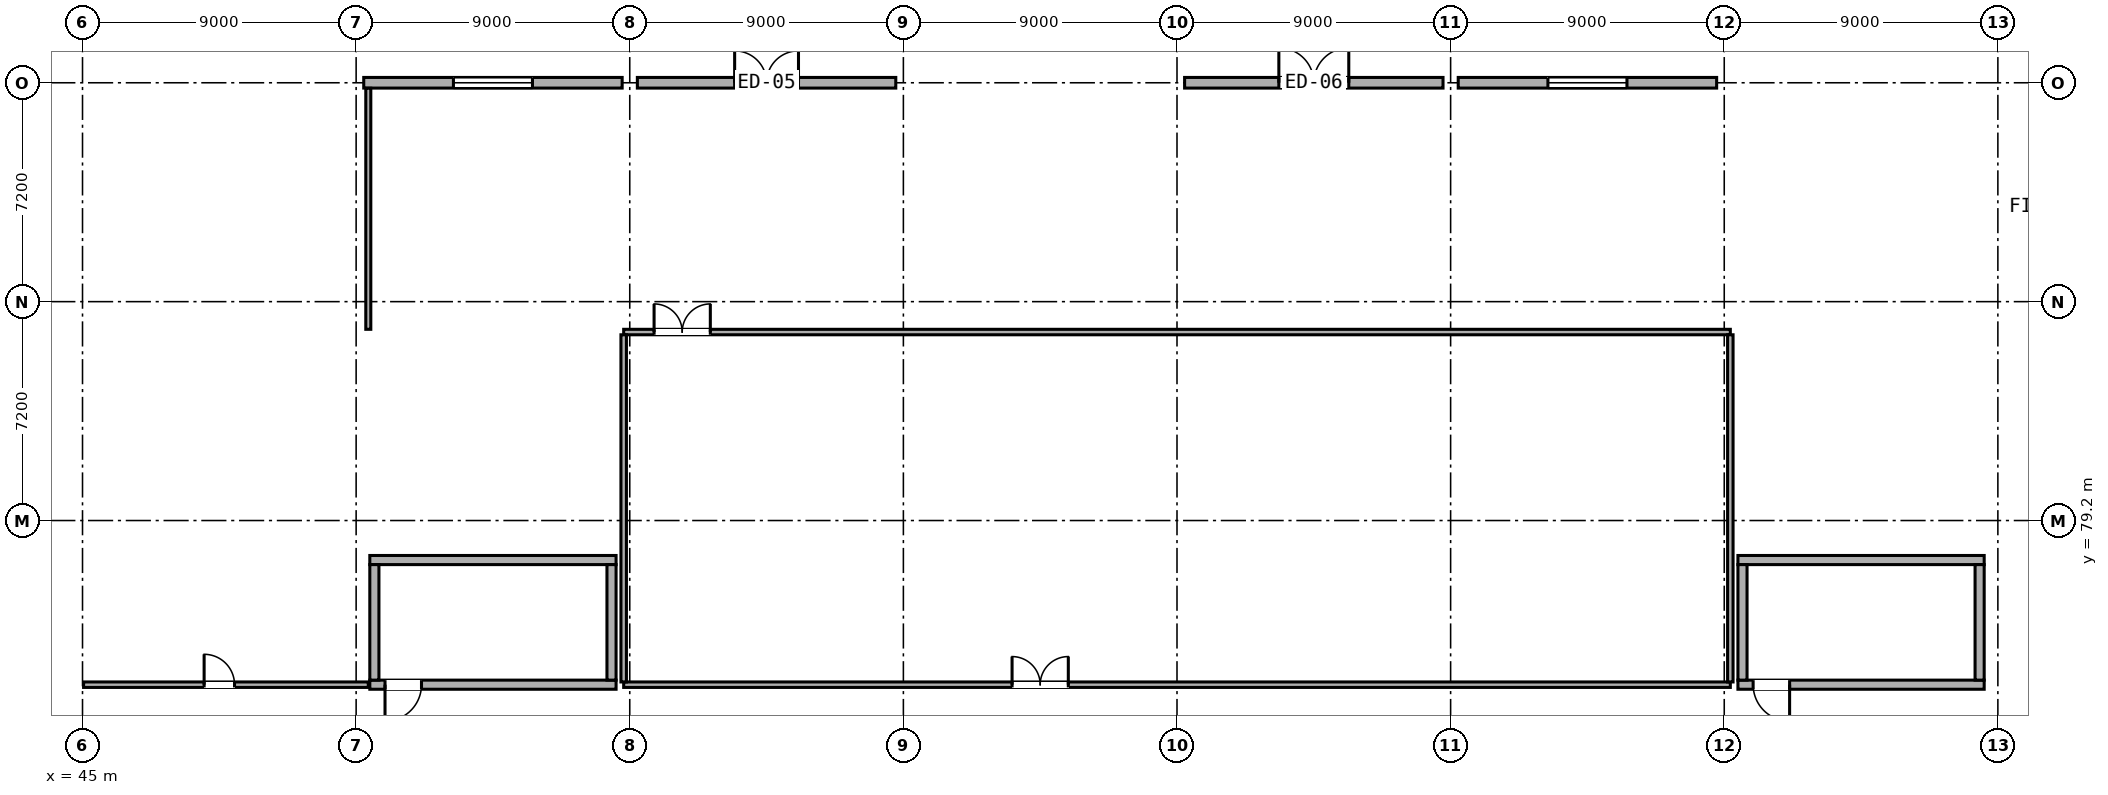
"""IFC4 building model, lengths in metres.
Left out: names, types, materials, properties, quantities, classifications, styles, units other than length and angle.
Written with IfcOpenShell. Run it as: python <this file> out.ifc"""

import sys

from ifc_helpers import new_model, si_unit, direction, frame, frame_2d, origin, origin_2d, place, context, subcontext, project, spatial, rectangle, hollow_rectangle, extrude, element, fill, save


model = new_model("IFC4")
c1 = context("Model", 3, precision=1e-05, world=origin(), true_north=direction((0.0, 1.0)))
c2 = subcontext(c1, "Body", "Model", "MODEL_VIEW")
j1 = project(units=[si_unit("LENGTHUNIT", "METRE"), si_unit("PLANEANGLEUNIT", "RADIAN")], contexts=[c1])
p1 = place(None, origin())
s1 = spatial("IfcSite", under=j1, at=p1, CompositionType="ELEMENT")
p2 = place(p1, origin())
s2 = spatial("IfcBuilding", under=s1, at=p2, CompositionType="ELEMENT")
p3 = place(p2, origin())
s3 = spatial("IfcBuildingStorey", under=s2, at=p3, CompositionType="ELEMENT", Elevation=0.0)
for number, where, z_axis, x_axis in (
    (1, (45.0, 79.2, 0.0), (0.0, 0.0, 1.0), (1.0, 0.0, 0.0)),
    (2, (45.0, 86.4, 0.0), (0.0, 0.0, 1.0), (1.0, 0.0, 0.0)),
    (3, (45.0, 93.6, 0.0), (0.0, 0.0, 1.0), (1.0, 0.0, 0.0)),
):
    element("IfcColumn", number, at=place(p3, frame(where, z_axis=z_axis, x_axis=x_axis)), inside=s3, PredefinedType="COLUMN", context=c2, shape_type="SweptSolid", body=[
        extrude(hollow_rectangle(XDim=0.5, YDim=0.5, WallThickness=0.022, at=origin_2d()), origin(), (0.0, 0.0, 1.0), 4.8),
    ])
for number, where, z_axis, x_axis in (
    (4, (54.0, 79.2, 0.0), (0.0, 0.0, 1.0), (1.0, 0.0, 0.0)),
    (5, (54.0, 86.4, 0.0), (0.0, 0.0, 1.0), (1.0, 0.0, 0.0)),
):
    element("IfcColumn", number, at=place(p3, frame(where, z_axis=z_axis, x_axis=x_axis)), inside=s3, PredefinedType="COLUMN", context=c2, shape_type="SweptSolid", body=[
        extrude(hollow_rectangle(XDim=0.65, YDim=0.65, WallThickness=0.025, at=origin_2d()), origin(), (0.0, 0.0, 1.0), 4.8),
    ])
p4 = place(p3, frame((54.0, 93.6, 0.0), z_axis=(0.0, 0.0, 1.0), x_axis=(1.0, 0.0, 0.0)))
e6 = element("IfcColumn", 6, at=p4, inside=s3, PredefinedType="COLUMN", context=c2, shape_type="SweptSolid", body=[
    extrude(hollow_rectangle(XDim=0.5, YDim=0.5, WallThickness=0.022, at=origin_2d()), origin(), (0.0, 0.0, 1.0), 4.8),
])
for number, where, z_axis, x_axis in (
    (7, (63.0, 79.2, 0.0), (0.0, 0.0, 1.0), (1.0, 0.0, 0.0)),
    (8, (63.0, 86.4, 0.0), (0.0, 0.0, 1.0), (1.0, 0.0, 0.0)),
):
    element("IfcColumn", number, at=place(p3, frame(where, z_axis=z_axis, x_axis=x_axis)), inside=s3, PredefinedType="COLUMN", context=c2, shape_type="SweptSolid", body=[
        extrude(hollow_rectangle(XDim=0.65, YDim=0.65, WallThickness=0.025, at=origin_2d()), origin(), (0.0, 0.0, 1.0), 4.8),
    ])
p5 = place(p3, frame((63.0, 93.6, 0.0), z_axis=(0.0, 0.0, 1.0), x_axis=(1.0, 0.0, 0.0)))
e9 = element("IfcColumn", 9, at=p5, inside=s3, PredefinedType="COLUMN", context=c2, shape_type="SweptSolid", body=[
    extrude(hollow_rectangle(XDim=0.5, YDim=0.5, WallThickness=0.022, at=origin_2d()), origin(), (0.0, 0.0, 1.0), 4.8),
])
for number, where, z_axis, x_axis in (
    (10, (72.0, 79.2, 0.0), (0.0, 0.0, 1.0), (1.0, 0.0, 0.0)),
    (11, (72.0, 86.4, 0.0), (0.0, 0.0, 1.0), (1.0, 0.0, 0.0)),
):
    element("IfcColumn", number, at=place(p3, frame(where, z_axis=z_axis, x_axis=x_axis)), inside=s3, PredefinedType="COLUMN", context=c2, shape_type="SweptSolid", body=[
        extrude(hollow_rectangle(XDim=0.65, YDim=0.65, WallThickness=0.025, at=origin_2d()), origin(), (0.0, 0.0, 1.0), 4.8),
    ])
p6 = place(p3, frame((72.0, 93.6, 0.0), z_axis=(0.0, 0.0, 1.0), x_axis=(1.0, 0.0, 0.0)))
e12 = element("IfcColumn", 12, at=p6, inside=s3, PredefinedType="COLUMN", context=c2, shape_type="SweptSolid", body=[
    extrude(hollow_rectangle(XDim=0.5, YDim=0.5, WallThickness=0.022, at=origin_2d()), origin(), (0.0, 0.0, 1.0), 4.8),
])
for number, where, z_axis, x_axis in (
    (13, (81.0, 79.2, 0.0), (0.0, 0.0, 1.0), (1.0, 0.0, 0.0)),
    (14, (81.0, 86.4, 0.0), (0.0, 0.0, 1.0), (1.0, 0.0, 0.0)),
):
    element("IfcColumn", number, at=place(p3, frame(where, z_axis=z_axis, x_axis=x_axis)), inside=s3, PredefinedType="COLUMN", context=c2, shape_type="SweptSolid", body=[
        extrude(hollow_rectangle(XDim=0.65, YDim=0.65, WallThickness=0.025, at=origin_2d()), origin(), (0.0, 0.0, 1.0), 4.8),
    ])
p7 = place(p3, frame((81.0, 93.6, 0.0), z_axis=(0.0, 0.0, 1.0), x_axis=(1.0, 0.0, 0.0)))
e15 = element("IfcColumn", 15, at=p7, inside=s3, PredefinedType="COLUMN", context=c2, shape_type="SweptSolid", body=[
    extrude(hollow_rectangle(XDim=0.5, YDim=0.5, WallThickness=0.022, at=origin_2d()), origin(), (0.0, 0.0, 1.0), 4.8),
])
for number, where, z_axis, x_axis in (
    (16, (90.0, 79.2, 0.0), (0.0, 0.0, 1.0), (1.0, 0.0, 0.0)),
    (17, (90.0, 86.4, 0.0), (0.0, 0.0, 1.0), (1.0, 0.0, 0.0)),
):
    element("IfcColumn", number, at=place(p3, frame(where, z_axis=z_axis, x_axis=x_axis)), inside=s3, PredefinedType="COLUMN", context=c2, shape_type="SweptSolid", body=[
        extrude(hollow_rectangle(XDim=0.65, YDim=0.65, WallThickness=0.025, at=origin_2d()), origin(), (0.0, 0.0, 1.0), 4.8),
    ])
p8 = place(p3, frame((90.0, 93.6, 0.0), z_axis=(0.0, 0.0, 1.0), x_axis=(1.0, 0.0, 0.0)))
e18 = element("IfcColumn", 18, at=p8, inside=s3, PredefinedType="COLUMN", context=c2, shape_type="SweptSolid", body=[
    extrude(hollow_rectangle(XDim=0.5, YDim=0.5, WallThickness=0.022, at=origin_2d()), origin(), (0.0, 0.0, 1.0), 4.8),
])
for number, where, z_axis, x_axis in (
    (19, (99.0, 79.2, 0.0), (0.0, 0.0, 1.0), (1.0, 0.0, 0.0)),
    (20, (99.0, 86.4, 0.0), (0.0, 0.0, 1.0), (1.0, 0.0, 0.0)),
):
    element("IfcColumn", number, at=place(p3, frame(where, z_axis=z_axis, x_axis=x_axis)), inside=s3, PredefinedType="COLUMN", context=c2, shape_type="SweptSolid", body=[
        extrude(hollow_rectangle(XDim=0.65, YDim=0.65, WallThickness=0.025, at=origin_2d()), origin(), (0.0, 0.0, 1.0), 4.8),
    ])
for number, where, z_axis, x_axis in (
    (21, (99.0, 93.6, 0.0), (0.0, 0.0, 1.0), (1.0, 0.0, 0.0)),
    (22, (108.0, 79.2, 0.0), (0.0, 0.0, 1.0), (1.0, 0.0, 0.0)),
    (23, (108.0, 86.4, 0.0), (0.0, 0.0, 1.0), (1.0, 0.0, 0.0)),
    (24, (108.0, 93.6, 0.0), (0.0, 0.0, 1.0), (1.0, 0.0, 0.0)),
):
    element("IfcColumn", number, at=place(p3, frame(where, z_axis=z_axis, x_axis=x_axis)), inside=s3, PredefinedType="COLUMN", context=c2, shape_type="SweptSolid", body=[
        extrude(hollow_rectangle(XDim=0.5, YDim=0.5, WallThickness=0.022, at=origin_2d()), origin(), (0.0, 0.0, 1.0), 4.8),
    ])
p9 = place(p3, frame((62.75, 93.6, 0.0), z_axis=(0.0, 0.0, 1.0), x_axis=(-1.0, 0.0, 0.0)))
e25 = element("IfcWall", 25, at=p9, inside=s3, PredefinedType="STANDARD", context=c2, shape_type="SweptSolid", body=[
    extrude(rectangle(XDim=8.5, YDim=0.35, at=frame_2d((4.25, 0.0))), origin(), (0.0, 0.0, 1.0), 4.055),
])
p10 = place(p9, frame((2.95, 0.0, 0.85)))
e26 = element("IfcOpeningElement", 26, at=p10, cuts=e25, PredefinedType="OPENING", context=c2, shape_type="SweptSolid", body=[
    extrude(rectangle(XDim=2.6, YDim=1.6, at=frame_2d((1.3, 0.8))), frame((0.0, 0.187, 0.0), z_axis=(0.0, -1.0, 0.0), x_axis=(1.0, 0.0, 0.0)), (0.0, 0.0, 1.0), 0.374),
])
p11 = place(p3, frame((71.75, 93.6, 0.0), z_axis=(0.0, 0.0, 1.0), x_axis=(-1.0, 0.0, 0.0)))
e27 = element("IfcWall", 27, at=p11, inside=s3, PredefinedType="STANDARD", context=c2, shape_type="SweptSolid", body=[
    extrude(rectangle(XDim=8.5, YDim=0.35, at=frame_2d((4.25, 0.0))), origin(), (0.0, 0.0, 1.0), 4.055),
])
p12 = place(p11, frame((3.2, 0.0, 0.0)))
e28 = element("IfcOpeningElement", 28, at=p12, cuts=e27, PredefinedType="OPENING", context=c2, shape_type="SweptSolid", body=[
    extrude(rectangle(XDim=2.1, YDim=2.45, at=frame_2d((1.05, 1.225))), frame((0.0, 0.187, 0.0), z_axis=(0.0, -1.0, 0.0), x_axis=(1.0, 0.0, 0.0)), (0.0, 0.0, 1.0), 0.374),
])
p13 = place(p3, frame((89.75, 93.6, 0.0), z_axis=(0.0, 0.0, 1.0), x_axis=(-1.0, 0.0, 0.0)))
e29 = element("IfcWall", 29, at=p13, inside=s3, PredefinedType="STANDARD", context=c2, shape_type="SweptSolid", body=[
    extrude(rectangle(XDim=8.5, YDim=0.35, at=frame_2d((4.25, 0.0))), origin(), (0.0, 0.0, 1.0), 4.055),
])
p14 = place(p13, frame((3.1, 0.0, 0.0)))
e30 = element("IfcOpeningElement", 30, at=p14, cuts=e29, PredefinedType="OPENING", context=c2, shape_type="SweptSolid", body=[
    extrude(rectangle(XDim=2.3, YDim=2.5, at=frame_2d((1.15, 1.25))), frame((0.0, 0.187, 0.0), z_axis=(0.0, -1.0, 0.0), x_axis=(1.0, 0.0, 0.0)), (0.0, 0.0, 1.0), 0.374),
])
p15 = place(p3, frame((98.75, 93.6, 0.0), z_axis=(0.0, 0.0, 1.0), x_axis=(-1.0, 0.0, 0.0)))
e31 = element("IfcWall", 31, at=p15, inside=s3, PredefinedType="STANDARD", context=c2, shape_type="SweptSolid", body=[
    extrude(rectangle(XDim=8.5, YDim=0.35, at=frame_2d((4.25, 0.0))), origin(), (0.0, 0.0, 1.0), 4.055),
])
p16 = place(p15, frame((2.95, 0.0, 0.85)))
e32 = element("IfcOpeningElement", 32, at=p16, cuts=e31, PredefinedType="OPENING", context=c2, shape_type="SweptSolid", body=[
    extrude(rectangle(XDim=2.6, YDim=1.6, at=frame_2d((1.3, 0.8))), frame((0.0, 0.187, 0.0), z_axis=(0.0, -1.0, 0.0), x_axis=(1.0, 0.0, 0.0)), (0.0, 0.0, 1.0), 0.374),
])
p17 = place(p3, frame((54.45, 73.8, 0.0), z_axis=(0.0, 0.0, 1.0), x_axis=(1.0, 0.0, 0.0)))
e33 = element("IfcWall", 33, at=p17, inside=s3, PredefinedType="SHEAR", context=c2, shape_type="SweptSolid", body=[
    extrude(rectangle(XDim=8.1, YDim=0.3, at=frame_2d((4.05, 0.0))), origin(), (0.0, 0.0, 1.0), 4.555),
])
p18 = place(p17, frame((0.5, 0.0, 0.0)))
e34 = element("IfcOpeningElement", 34, at=p18, cuts=e33, PredefinedType="OPENING", context=c2, shape_type="SweptSolid", body=[
    extrude(rectangle(XDim=1.2, YDim=2.1, at=frame_2d((0.6, 1.05))), frame((0.0, 0.162, 0.0), z_axis=(0.0, -1.0, 0.0), x_axis=(1.0, 0.0, 0.0)), (0.0, 0.0, 1.0), 0.324),
])
p19 = place(p3, frame((54.45, 77.9, 0.0), z_axis=(0.0, 0.0, 1.0), x_axis=(1.0, 0.0, 0.0)))
e35 = element("IfcWall", 35, at=p19, inside=s3, PredefinedType="SHEAR", context=c2, shape_type="SweptSolid", body=[
    extrude(rectangle(XDim=8.1, YDim=0.3, at=frame_2d((4.05, 0.0))), origin(), (0.0, 0.0, 1.0), 4.555),
])
for number, where, z_axis, x_axis in (
    (36, (54.6, 73.95, 0.0), (0.0, 0.0, 1.0), (0.0, 1.0, 0.0)),
    (37, (62.4, 73.95, 0.0), (0.0, 0.0, 1.0), (0.0, 1.0, 0.0)),
):
    element("IfcWall", number, at=place(p3, frame(where, z_axis=z_axis, x_axis=x_axis)), inside=s3, PredefinedType="SHEAR", context=c2, shape_type="SweptSolid", body=[
        extrude(rectangle(XDim=3.8, YDim=0.3, at=frame_2d((1.9, 0.0))), origin(), (0.0, 0.0, 1.0), 4.555),
    ])
p20 = place(p3, frame((99.45, 73.8, 0.0), z_axis=(0.0, 0.0, 1.0), x_axis=(1.0, 0.0, 0.0)))
e38 = element("IfcWall", 38, at=p20, inside=s3, PredefinedType="SHEAR", context=c2, shape_type="SweptSolid", body=[
    extrude(rectangle(XDim=8.1, YDim=0.3, at=frame_2d((4.05, 0.0))), origin(), (0.0, 0.0, 1.0), 4.555),
])
p21 = place(p20, frame((0.5, 0.0, 0.0)))
e39 = element("IfcOpeningElement", 39, at=p21, cuts=e38, PredefinedType="OPENING", context=c2, shape_type="SweptSolid", body=[
    extrude(rectangle(XDim=1.2, YDim=2.1, at=frame_2d((0.6, 1.05))), frame((0.0, 0.162, 0.0), z_axis=(0.0, -1.0, 0.0), x_axis=(1.0, 0.0, 0.0)), (0.0, 0.0, 1.0), 0.324),
])
p22 = place(p3, frame((99.45, 77.9, 0.0), z_axis=(0.0, 0.0, 1.0), x_axis=(1.0, 0.0, 0.0)))
e40 = element("IfcWall", 40, at=p22, inside=s3, PredefinedType="SHEAR", context=c2, shape_type="SweptSolid", body=[
    extrude(rectangle(XDim=8.1, YDim=0.3, at=frame_2d((4.05, 0.0))), origin(), (0.0, 0.0, 1.0), 4.555),
])
for number, where, z_axis, x_axis in (
    (41, (99.6, 73.95, 0.0), (0.0, 0.0, 1.0), (0.0, 1.0, 0.0)),
    (42, (107.4, 73.95, 0.0), (0.0, 0.0, 1.0), (0.0, 1.0, 0.0)),
):
    element("IfcWall", number, at=place(p3, frame(where, z_axis=z_axis, x_axis=x_axis)), inside=s3, PredefinedType="SHEAR", context=c2, shape_type="SweptSolid", body=[
        extrude(rectangle(XDim=3.8, YDim=0.3, at=frame_2d((1.9, 0.0))), origin(), (0.0, 0.0, 1.0), 4.555),
    ])
p23 = place(p3, frame((62.8, 73.8, 0.0), z_axis=(0.0, 0.0, 1.0), x_axis=(1.0, 0.0, 0.0)))
e43 = element("IfcWall", 43, at=p23, inside=s3, PredefinedType="PARTITIONING", context=c2, shape_type="SweptSolid", body=[
    extrude(rectangle(XDim=36.4, YDim=0.18, at=frame_2d((18.2, 0.0))), origin(), (0.0, 0.0, 1.0), 4.555),
])
p24 = place(p23, frame((12.775, 0.0, 0.0)))
e44 = element("IfcOpeningElement", 44, at=p24, cuts=e43, PredefinedType="OPENING", context=c2, shape_type="SweptSolid", body=[
    extrude(rectangle(XDim=1.85, YDim=2.12, at=frame_2d((0.925, 1.06))), frame((0.0, 0.102, 0.0), z_axis=(0.0, -1.0, 0.0), x_axis=(1.0, 0.0, 0.0)), (0.0, 0.0, 1.0), 0.204),
])
p25 = place(p3, frame((62.8, 85.4, 0.0), z_axis=(0.0, 0.0, 1.0), x_axis=(1.0, 0.0, 0.0)))
e45 = element("IfcWall", 45, at=p25, inside=s3, PredefinedType="PARTITIONING", context=c2, shape_type="SweptSolid", body=[
    extrude(rectangle(XDim=36.4, YDim=0.18, at=frame_2d((18.2, 0.0))), origin(), (0.0, 0.0, 1.0), 4.555),
])
p26 = place(p25, frame((1.0, 0.0, 0.0)))
e46 = element("IfcOpeningElement", 46, at=p26, cuts=e45, PredefinedType="OPENING", context=c2, shape_type="SweptSolid", body=[
    extrude(rectangle(XDim=1.85, YDim=2.12, at=frame_2d((0.925, 1.06))), frame((0.0, 0.102, 0.0), z_axis=(0.0, -1.0, 0.0), x_axis=(1.0, 0.0, 0.0)), (0.0, 0.0, 1.0), 0.204),
])
for number, where, z_axis, x_axis in (
    (47, (62.8, 73.89, 0.0), (0.0, 0.0, 1.0), (0.0, 1.0, 0.0)),
    (48, (99.2, 73.89, 0.0), (0.0, 0.0, 1.0), (0.0, 1.0, 0.0)),
):
    element("IfcWall", number, at=place(p3, frame(where, z_axis=z_axis, x_axis=x_axis)), inside=s3, PredefinedType="PARTITIONING", context=c2, shape_type="SweptSolid", body=[
        extrude(rectangle(XDim=11.42, YDim=0.18, at=frame_2d((5.71, 0.0))), origin(), (0.0, 0.0, 1.0), 3.835),
    ])
p27 = place(p3, frame((45.035, 73.8, 0.0), z_axis=(0.0, 0.0, 1.0), x_axis=(1.0, 0.0, 0.0)))
e49 = element("IfcWall", 49, at=p27, inside=s3, PredefinedType="PARTITIONING", context=c2, shape_type="SweptSolid", body=[
    extrude(rectangle(XDim=9.365, YDim=0.18, at=frame_2d((4.683, 0.0))), origin(), (0.0, 0.0, 1.0), 4.555),
])
p28 = place(p27, frame((3.965, 0.0, 0.0)))
e50 = element("IfcOpeningElement", 50, at=p28, cuts=e49, PredefinedType="OPENING", context=c2, shape_type="SweptSolid", body=[
    extrude(rectangle(XDim=1.0, YDim=2.08, at=frame_2d((0.5, 1.04))), frame((0.0, 0.102, 0.0), z_axis=(0.0, -1.0, 0.0), x_axis=(1.0, 0.0, 0.0)), (0.0, 0.0, 1.0), 0.204),
])
p29 = place(p3, frame((54.4, 85.49, 0.0), z_axis=(0.0, 0.0, 1.0), x_axis=(0.0, 1.0, 0.0)))
e51 = element("IfcWall", 51, at=p29, inside=s3, PredefinedType="PARTITIONING", context=c2, shape_type="SweptSolid", body=[
    extrude(rectangle(XDim=7.93, YDim=0.165, at=frame_2d((3.965, 0.0))), origin(), (0.0, 0.0, 1.0), 4.555),
])
p30 = place(p10, origin())
e52 = element("IfcWindow", 52, at=p30, inside=s3, PartitioningType="DOUBLE_PANEL_VERTICAL", PredefinedType="WINDOW", context=c2, shape_type="SweptSolid", body=[
    extrude(rectangle(XDim=2.6, YDim=1.6, at=frame_2d((1.3, 0.8))), frame((0.0, 0.03, 0.0), z_axis=(0.0, -1.0, 0.0), x_axis=(1.0, 0.0, 0.0)), (0.0, 0.0, 1.0), 0.06),
])
fill(e26, e52)
p31 = place(p12, frame((2.1, 0.0, 0.0), z_axis=(0.0, 0.0, 1.0), x_axis=(-1.0, 0.0, 0.0)))
e53 = element("IfcDoor", 53, at=p31, inside=s3, OperationType="DOUBLE_DOOR_SINGLE_SWING", PredefinedType="DOOR", context=c2, shape_type="SweptSolid", body=[
    extrude(rectangle(XDim=2.1, YDim=2.45, at=frame_2d((1.05, 1.225))), frame((0.0, 0.025, 0.0), z_axis=(0.0, -1.0, 0.0), x_axis=(1.0, 0.0, 0.0)), (0.0, 0.0, 1.0), 0.05),
])
fill(e28, e53)
p32 = place(p14, frame((2.3, 0.0, 0.0), z_axis=(0.0, 0.0, 1.0), x_axis=(-1.0, 0.0, 0.0)))
e54 = element("IfcDoor", 54, at=p32, inside=s3, OperationType="DOUBLE_DOOR_SINGLE_SWING", PredefinedType="DOOR", context=c2, shape_type="SweptSolid", body=[
    extrude(rectangle(XDim=2.3, YDim=2.5, at=frame_2d((1.15, 1.25))), frame((0.0, 0.025, 0.0), z_axis=(0.0, -1.0, 0.0), x_axis=(1.0, 0.0, 0.0)), (0.0, 0.0, 1.0), 0.05),
])
fill(e30, e54)
p33 = place(p16, origin())
e55 = element("IfcWindow", 55, at=p33, inside=s3, PartitioningType="DOUBLE_PANEL_VERTICAL", PredefinedType="WINDOW", context=c2, shape_type="SweptSolid", body=[
    extrude(rectangle(XDim=2.6, YDim=1.6, at=frame_2d((1.3, 0.8))), frame((0.0, 0.03, 0.0), z_axis=(0.0, -1.0, 0.0), x_axis=(1.0, 0.0, 0.0)), (0.0, 0.0, 1.0), 0.06),
])
fill(e32, e55)
p34 = place(p18, frame((1.2, 0.0, 0.0), z_axis=(0.0, 0.0, 1.0), x_axis=(-1.0, 0.0, 0.0)))
e56 = element("IfcDoor", 56, at=p34, inside=s3, OperationType="SINGLE_SWING_RIGHT", PredefinedType="DOOR", context=c2, shape_type="SweptSolid", body=[
    extrude(rectangle(XDim=1.2, YDim=2.1, at=frame_2d((0.6, 1.05))), frame((0.0, 0.025, 0.0), z_axis=(0.0, -1.0, 0.0), x_axis=(1.0, 0.0, 0.0)), (0.0, 0.0, 1.0), 0.05),
])
fill(e34, e56)
p35 = place(p21, frame((1.2, 0.0, 0.0), z_axis=(0.0, 0.0, 1.0), x_axis=(-1.0, 0.0, 0.0)))
e57 = element("IfcDoor", 57, at=p35, inside=s3, OperationType="SINGLE_SWING_LEFT", PredefinedType="DOOR", context=c2, shape_type="SweptSolid", body=[
    extrude(rectangle(XDim=1.2, YDim=2.1, at=frame_2d((0.6, 1.05))), frame((0.0, 0.025, 0.0), z_axis=(0.0, -1.0, 0.0), x_axis=(1.0, 0.0, 0.0)), (0.0, 0.0, 1.0), 0.05),
])
fill(e39, e57)
p36 = place(p24, origin())
e58 = element("IfcDoor", 58, at=p36, inside=s3, OperationType="DOUBLE_DOOR_SINGLE_SWING", PredefinedType="DOOR", context=c2, shape_type="SweptSolid", body=[
    extrude(rectangle(XDim=1.85, YDim=2.12, at=frame_2d((0.925, 1.06))), frame((0.0, 0.025, 0.0), z_axis=(0.0, -1.0, 0.0), x_axis=(1.0, 0.0, 0.0)), (0.0, 0.0, 1.0), 0.05),
])
fill(e44, e58)
p37 = place(p28, origin())
e59 = element("IfcDoor", 59, at=p37, inside=s3, OperationType="SINGLE_SWING_LEFT", PredefinedType="DOOR", context=c2, shape_type="SweptSolid", body=[
    extrude(rectangle(XDim=1.0, YDim=2.08, at=frame_2d((0.5, 1.04))), frame((0.0, 0.025, 0.0), z_axis=(0.0, -1.0, 0.0), x_axis=(1.0, 0.0, 0.0)), (0.0, 0.0, 1.0), 0.05),
])
fill(e50, e59)
p38 = place(p26, origin())
e60 = element("IfcDoor", 60, at=p38, inside=s3, OperationType="DOUBLE_DOOR_SINGLE_SWING", PredefinedType="DOOR", context=c2, shape_type="SweptSolid", body=[
    extrude(rectangle(XDim=1.85, YDim=2.12, at=frame_2d((0.925, 1.06))), frame((0.0, 0.025, 0.0), z_axis=(0.0, -1.0, 0.0), x_axis=(1.0, 0.0, 0.0)), (0.0, 0.0, 1.0), 0.05),
])
fill(e46, e60)
save(model, sys.argv[1])
